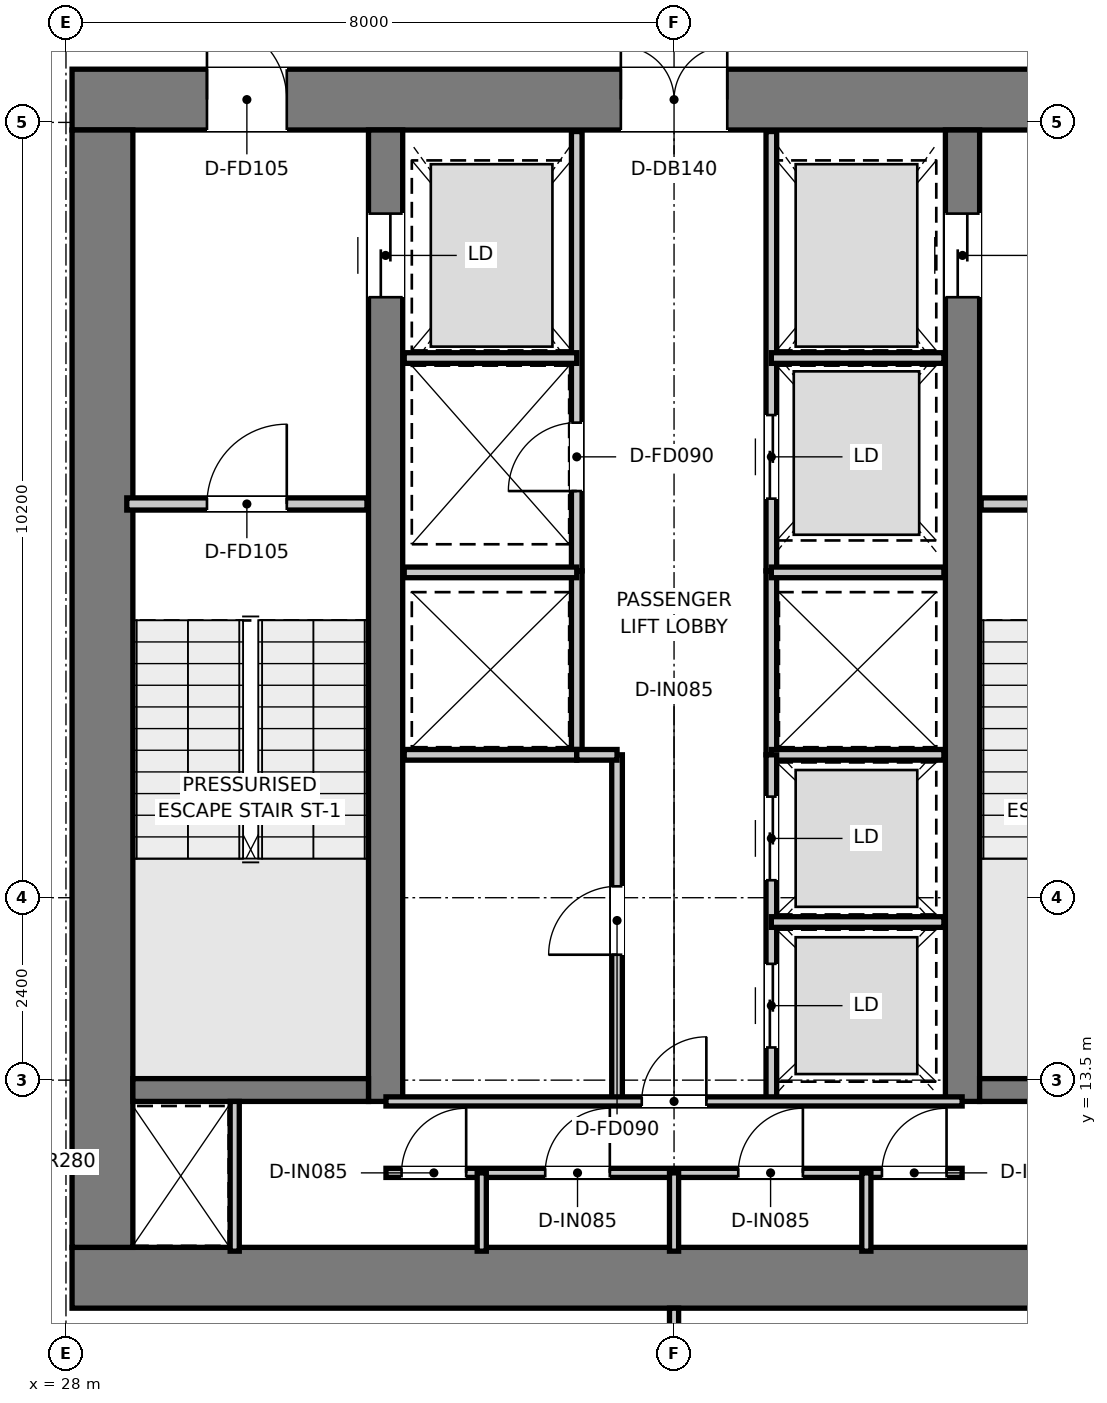
"""IFC4 building model, lengths in metres.
Left out: names, types, materials, properties, quantities, classifications, styles, units other than length and angle.
Written with IfcOpenShell. Run it as: python <this file> out.ifc"""

import sys

from ifc_helpers import new_model, si_unit, direction, frame, frame_2d, origin, place, context, subcontext, project, spatial, rectangle, extrude, element, fill, save


model = new_model("IFC4")
c1 = context("Model", 3, precision=1e-05, world=origin(), true_north=direction((0.0, 1.0)))
c2 = subcontext(c1, "Body", "Model", "MODEL_VIEW")
j1 = project(units=[si_unit("LENGTHUNIT", "METRE"), si_unit("PLANEANGLEUNIT", "RADIAN")], contexts=[c1])
p1 = place(None, origin())
s1 = spatial("IfcSite", under=j1, at=p1, CompositionType="ELEMENT")
p2 = place(p1, origin())
s2 = spatial("IfcBuilding", under=s1, at=p2, CompositionType="ELEMENT")
p3 = place(p2, frame((0.0, 0.0, 185.7)))
s3 = spatial("IfcBuildingStorey", under=s2, at=p3, CompositionType="ELEMENT", Elevation=185.7)
p4 = place(p3, frame((28.08, 10.9, 0.0), z_axis=(0.0, 0.0, 1.0), x_axis=(1.0, 0.0, 0.0)))
e1 = element("IfcWall", 1, at=p4, inside=s3, PredefinedType="SHEAR", context=c2, shape_type="SweptSolid", body=[
    extrude(rectangle(XDim=15.84, YDim=0.8, at=frame_2d((7.92, 0.0))), origin(), (0.0, 0.0, 1.0), 3.95),
])
p5 = place(p3, frame((28.08, 26.4, 0.0), z_axis=(0.0, 0.0, 1.0), x_axis=(1.0, 0.0, 0.0)))
e2 = element("IfcWall", 2, at=p5, inside=s3, PredefinedType="SHEAR", context=c2, shape_type="SweptSolid", body=[
    extrude(rectangle(XDim=15.84, YDim=0.8, at=frame_2d((7.92, 0.0))), origin(), (0.0, 0.0, 1.0), 3.95),
])
p6 = place(p5, frame((7.22, 0.0, 0.0)))
e3 = element("IfcOpeningElement", 3, at=p6, cuts=e2, PredefinedType="OPENING", context=c2, shape_type="SweptSolid", body=[
    extrude(rectangle(XDim=1.4, YDim=2.2, at=frame_2d((0.7, 1.1))), frame((0.0, 0.41, 0.0), z_axis=(0.0, -1.0, 0.0), x_axis=(1.0, 0.0, 0.0)), (0.0, 0.0, 1.0), 0.82),
])
p7 = place(p5, frame((1.775, 0.0, 0.0)))
e4 = element("IfcOpeningElement", 4, at=p7, cuts=e2, PredefinedType="OPENING", context=c2, shape_type="SweptSolid", body=[
    extrude(rectangle(XDim=1.05, YDim=2.1, at=frame_2d((0.525, 1.05))), frame((0.0, 0.41, 0.0), z_axis=(0.0, -1.0, 0.0), x_axis=(1.0, 0.0, 0.0)), (0.0, 0.0, 1.0), 0.82),
])
p8 = place(p5, frame((13.015, 0.0, 0.0)))
e5 = element("IfcOpeningElement", 5, at=p8, cuts=e2, PredefinedType="OPENING", context=c2, shape_type="SweptSolid", body=[
    extrude(rectangle(XDim=1.05, YDim=2.1, at=frame_2d((0.525, 1.05))), frame((0.0, 0.41, 0.0), z_axis=(0.0, -1.0, 0.0), x_axis=(1.0, 0.0, 0.0)), (0.0, 0.0, 1.0), 0.82),
])
p9 = place(p3, frame((28.48, 11.3, 0.0), z_axis=(0.0, 0.0, 1.0), x_axis=(0.0, 1.0, 0.0)))
e6 = element("IfcWall", 6, at=p9, inside=s3, PredefinedType="SHEAR", context=c2, shape_type="SweptSolid", body=[
    extrude(rectangle(XDim=14.7, YDim=0.8, at=frame_2d((7.35, 0.0))), origin(), (0.0, 0.0, 1.0), 3.95),
])
p10 = place(p3, frame((32.205, 13.22, 0.0), z_axis=(0.0, 0.0, 1.0), x_axis=(0.0, 1.0, 0.0)))
e7 = element("IfcWall", 7, at=p10, inside=s3, PredefinedType="SHEAR", context=c2, shape_type="SweptSolid", body=[
    extrude(rectangle(XDim=12.78, YDim=0.45, at=frame_2d((6.39, 0.0))), origin(), (0.0, 0.0, 1.0), 3.95),
])
p11 = place(p10, frame((10.58, 0.0, 0.0)))
e8 = element("IfcOpeningElement", 8, at=p11, cuts=e7, PredefinedType="OPENING", context=c2, shape_type="SweptSolid", body=[
    extrude(rectangle(XDim=1.1, YDim=2.15, at=frame_2d((0.55, 1.075))), frame((0.0, 0.235, 0.0), z_axis=(0.0, -1.0, 0.0), x_axis=(1.0, 0.0, 0.0)), (0.0, 0.0, 1.0), 0.47),
])
p12 = place(p3, frame((39.795, 13.22, 0.0), z_axis=(0.0, 0.0, 1.0), x_axis=(0.0, 1.0, 0.0)))
e9 = element("IfcWall", 9, at=p12, inside=s3, PredefinedType="SHEAR", context=c2, shape_type="SweptSolid", body=[
    extrude(rectangle(XDim=12.78, YDim=0.45, at=frame_2d((6.39, 0.0))), origin(), (0.0, 0.0, 1.0), 3.95),
])
p13 = place(p12, frame((10.58, 0.0, 0.0)))
e10 = element("IfcOpeningElement", 10, at=p13, cuts=e9, PredefinedType="OPENING", context=c2, shape_type="SweptSolid", body=[
    extrude(rectangle(XDim=1.1, YDim=2.15, at=frame_2d((0.55, 1.075))), frame((0.0, 0.235, 0.0), z_axis=(0.0, -1.0, 0.0), x_axis=(1.0, 0.0, 0.0)), (0.0, 0.0, 1.0), 0.47),
])
for number, where, z_axis, x_axis in (
    (11, (28.88, 13.37, 0.0), (0.0, 0.0, 1.0), (1.0, 0.0, 0.0)),
    (12, (40.02, 13.37, 0.0), (0.0, 0.0, 1.0), (1.0, 0.0, 0.0)),
):
    element("IfcWall", number, at=place(p3, frame(where, z_axis=z_axis, x_axis=x_axis)), inside=s3, PredefinedType="SHEAR", context=c2, shape_type="SweptSolid", body=[
        extrude(rectangle(XDim=3.1, YDim=0.3, at=frame_2d((1.55, 0.0))), origin(), (0.0, 0.0, 1.0), 3.95),
    ])
p14 = place(p3, frame((28.8, 21.08, 0.0), z_axis=(0.0, 0.0, 1.0), x_axis=(1.0, 0.0, 0.0)))
e13 = element("IfcWall", 13, at=p14, inside=s3, PredefinedType="PARTITIONING", context=c2, shape_type="SweptSolid", body=[
    extrude(rectangle(XDim=3.16, YDim=0.16, at=frame_2d((1.58, 0.0))), origin(), (0.0, 0.0, 1.0), 3.67),
])
p15 = place(p14, frame((1.055, 0.0, 0.0)))
e14 = element("IfcOpeningElement", 14, at=p15, cuts=e13, PredefinedType="OPENING", context=c2, shape_type="SweptSolid", body=[
    extrude(rectangle(XDim=1.05, YDim=2.1, at=frame_2d((0.525, 1.05))), frame((0.0, 0.09, 0.0), z_axis=(0.0, -1.0, 0.0), x_axis=(1.0, 0.0, 0.0)), (0.0, 0.0, 1.0), 0.18),
])
p16 = place(p3, frame((40.04, 21.08, 0.0), z_axis=(0.0, 0.0, 1.0), x_axis=(1.0, 0.0, 0.0)))
e15 = element("IfcWall", 15, at=p16, inside=s3, PredefinedType="PARTITIONING", context=c2, shape_type="SweptSolid", body=[
    extrude(rectangle(XDim=3.16, YDim=0.16, at=frame_2d((1.58, 0.0))), origin(), (0.0, 0.0, 1.0), 3.67),
])
p17 = place(p16, frame((1.055, 0.0, 0.0)))
e16 = element("IfcOpeningElement", 16, at=p17, cuts=e15, PredefinedType="OPENING", context=c2, shape_type="SweptSolid", body=[
    extrude(rectangle(XDim=1.05, YDim=2.1, at=frame_2d((0.525, 1.05))), frame((0.0, 0.09, 0.0), z_axis=(0.0, -1.0, 0.0), x_axis=(1.0, 0.0, 0.0)), (0.0, 0.0, 1.0), 0.18),
])
p18 = place(p3, frame((34.72, 20.2, 0.0), z_axis=(0.0, 0.0, 1.0), x_axis=(0.0, 1.0, 0.0)))
e17 = element("IfcWall", 17, at=p18, inside=s3, PredefinedType="PARTITIONING", context=c2, shape_type="SweptSolid", body=[
    extrude(rectangle(XDim=5.78, YDim=0.14, at=frame_2d((2.89, 0.0))), origin(), (0.0, 0.0, 1.0), 2.67),
])
p19 = place(p18, frame((1.05, 0.0, 0.0)))
e18 = element("IfcOpeningElement", 18, at=p19, cuts=e17, PredefinedType="OPENING", context=c2, shape_type="SweptSolid", body=[
    extrude(rectangle(XDim=0.9, YDim=2.1, at=frame_2d((0.45, 1.05))), frame((0.0, 0.08, 0.0), z_axis=(0.0, -1.0, 0.0), x_axis=(1.0, 0.0, 0.0)), (0.0, 0.0, 1.0), 0.16),
])
p20 = place(p3, frame((37.28, 20.2, 0.0), z_axis=(0.0, 0.0, 1.0), x_axis=(0.0, 1.0, 0.0)))
e19 = element("IfcWall", 19, at=p20, inside=s3, PredefinedType="PARTITIONING", context=c2, shape_type="SweptSolid", body=[
    extrude(rectangle(XDim=5.78, YDim=0.14, at=frame_2d((2.89, 0.0))), origin(), (0.0, 0.0, 1.0), 2.67),
])
p21 = place(p20, frame((0.95, 0.0, 0.0)))
e20 = element("IfcOpeningElement", 20, at=p21, cuts=e19, PredefinedType="OPENING", context=c2, shape_type="SweptSolid", body=[
    extrude(rectangle(XDim=1.1, YDim=2.15, at=frame_2d((0.55, 1.075))), frame((0.0, 0.08, 0.0), z_axis=(0.0, -1.0, 0.0), x_axis=(1.0, 0.0, 0.0)), (0.0, 0.0, 1.0), 0.16),
])
for number, where, z_axis, x_axis in (
    (21, (32.45, 23.0, 0.0), (0.0, 0.0, 1.0), (1.0, 0.0, 0.0)),
    (22, (37.28, 23.0, 0.0), (0.0, 0.0, 1.0), (1.0, 0.0, 0.0)),
):
    element("IfcWall", number, at=place(p3, frame(where, z_axis=z_axis, x_axis=x_axis)), inside=s3, PredefinedType="PARTITIONING", context=c2, shape_type="SweptSolid", body=[
        extrude(rectangle(XDim=2.27, YDim=0.14, at=frame_2d((1.135, 0.0))), origin(), (0.0, 0.0, 1.0), 2.67),
    ])
for number, where, z_axis, x_axis in (
    (23, (34.72, 17.78, 0.0), (0.0, 0.0, 1.0), (0.0, 1.0, 0.0)),
    (24, (37.28, 17.78, 0.0), (0.0, 0.0, 1.0), (0.0, 1.0, 0.0)),
):
    element("IfcWall", number, at=place(p3, frame(where, z_axis=z_axis, x_axis=x_axis)), inside=s3, PredefinedType="PARTITIONING", context=c2, shape_type="SweptSolid", body=[
        extrude(rectangle(XDim=2.42, YDim=0.14, at=frame_2d((1.21, 0.0))), origin(), (0.0, 0.0, 1.0), 3.67),
    ])
for number, where, z_axis, x_axis in (
    (25, (32.45, 17.78, 0.0), (0.0, 0.0, 1.0), (1.0, 0.0, 0.0)),
    (26, (32.45, 20.18, 0.0), (0.0, 0.0, 1.0), (1.0, 0.0, 0.0)),
    (27, (37.28, 17.78, 0.0), (0.0, 0.0, 1.0), (1.0, 0.0, 0.0)),
    (28, (37.28, 20.18, 0.0), (0.0, 0.0, 1.0), (1.0, 0.0, 0.0)),
):
    element("IfcWall", number, at=place(p3, frame(where, z_axis=z_axis, x_axis=x_axis)), inside=s3, PredefinedType="PARTITIONING", context=c2, shape_type="SweptSolid", body=[
        extrude(rectangle(XDim=2.27, YDim=0.14, at=frame_2d((1.135, 0.0))), origin(), (0.0, 0.0, 1.0), 3.67),
    ])
p22 = place(p3, frame((35.25, 13.22, 0.0), z_axis=(0.0, 0.0, 1.0), x_axis=(0.0, 1.0, 0.0)))
e29 = element("IfcWall", 29, at=p22, inside=s3, PredefinedType="PARTITIONING", context=c2, shape_type="SweptSolid", body=[
    extrude(rectangle(XDim=4.56, YDim=0.14, at=frame_2d((2.28, 0.0))), origin(), (0.0, 0.0, 1.0), 3.67),
])
p23 = place(p22, frame((1.93, 0.0, 0.0)))
e30 = element("IfcOpeningElement", 30, at=p23, cuts=e29, PredefinedType="OPENING", context=c2, shape_type="SweptSolid", body=[
    extrude(rectangle(XDim=0.9, YDim=2.1, at=frame_2d((0.45, 1.05))), frame((0.0, 0.08, 0.0), z_axis=(0.0, -1.0, 0.0), x_axis=(1.0, 0.0, 0.0)), (0.0, 0.0, 1.0), 0.16),
])
p24 = place(p3, frame((34.72, 17.78, 0.0), z_axis=(0.0, 0.0, 1.0), x_axis=(1.0, 0.0, 0.0)))
e31 = element("IfcWall", 31, at=p24, inside=s3, PredefinedType="PARTITIONING", context=c2, shape_type="SweptSolid", body=[
    extrude(rectangle(XDim=0.53, YDim=0.14, at=frame_2d((0.265, 0.0))), origin(), (0.0, 0.0, 1.0), 3.67),
])
p25 = place(p3, frame((37.28, 13.22, 0.0), z_axis=(0.0, 0.0, 1.0), x_axis=(0.0, 1.0, 0.0)))
e32 = element("IfcWall", 32, at=p25, inside=s3, PredefinedType="PARTITIONING", context=c2, shape_type="SweptSolid", body=[
    extrude(rectangle(XDim=4.56, YDim=0.14, at=frame_2d((2.28, 0.0))), origin(), (0.0, 0.0, 1.0), 3.67),
])
p26 = place(p25, frame((0.71, 0.0, 0.0)))
e33 = element("IfcOpeningElement", 33, at=p26, cuts=e32, PredefinedType="OPENING", context=c2, shape_type="SweptSolid", body=[
    extrude(rectangle(XDim=1.1, YDim=2.15, at=frame_2d((0.55, 1.075))), frame((0.0, 0.08, 0.0), z_axis=(0.0, -1.0, 0.0), x_axis=(1.0, 0.0, 0.0)), (0.0, 0.0, 1.0), 0.16),
])
p27 = place(p25, frame((2.91, 0.0, 0.0)))
e34 = element("IfcOpeningElement", 34, at=p27, cuts=e32, PredefinedType="OPENING", context=c2, shape_type="SweptSolid", body=[
    extrude(rectangle(XDim=1.1, YDim=2.15, at=frame_2d((0.55, 1.075))), frame((0.0, 0.08, 0.0), z_axis=(0.0, -1.0, 0.0), x_axis=(1.0, 0.0, 0.0)), (0.0, 0.0, 1.0), 0.16),
])
p28 = place(p3, frame((37.28, 15.58, 0.0), z_axis=(0.0, 0.0, 1.0), x_axis=(1.0, 0.0, 0.0)))
e35 = element("IfcWall", 35, at=p28, inside=s3, PredefinedType="PARTITIONING", context=c2, shape_type="SweptSolid", body=[
    extrude(rectangle(XDim=2.27, YDim=0.14, at=frame_2d((1.135, 0.0))), origin(), (0.0, 0.0, 1.0), 3.67),
])
p29 = place(p3, frame((30.22, 11.25, 0.0), z_axis=(0.0, 0.0, 1.0), x_axis=(0.0, 1.0, 0.0)))
e36 = element("IfcWall", 36, at=p29, inside=s3, PredefinedType="PARTITIONING", context=c2, shape_type="SweptSolid", body=[
    extrude(rectangle(XDim=1.97, YDim=0.12, at=frame_2d((0.985, 0.0))), origin(), (0.0, 0.0, 1.0), 3.67),
])
p30 = place(p3, frame((32.21, 13.22, 0.0), z_axis=(0.0, 0.0, 1.0), x_axis=(1.0, 0.0, 0.0)))
e37 = element("IfcWall", 37, at=p30, inside=s3, PredefinedType="PARTITIONING", context=c2, shape_type="SweptSolid", body=[
    extrude(rectangle(XDim=7.58, YDim=0.12, at=frame_2d((3.79, 0.0))), origin(), (0.0, 0.0, 1.0), 3.67),
])
p31 = place(p30, frame((3.365, 0.0, 0.0)))
e38 = element("IfcOpeningElement", 38, at=p31, cuts=e37, PredefinedType="OPENING", context=c2, shape_type="SweptSolid", body=[
    extrude(rectangle(XDim=0.85, YDim=2.1, at=frame_2d((0.425, 1.05))), frame((0.0, 0.07, 0.0), z_axis=(0.0, -1.0, 0.0), x_axis=(1.0, 0.0, 0.0)), (0.0, 0.0, 1.0), 0.14),
])
p32 = place(p3, frame((32.21, 12.28, 0.0), z_axis=(0.0, 0.0, 1.0), x_axis=(1.0, 0.0, 0.0)))
e39 = element("IfcWall", 39, at=p32, inside=s3, PredefinedType="PARTITIONING", context=c2, shape_type="SweptSolid", body=[
    extrude(rectangle(XDim=7.58, YDim=0.12, at=frame_2d((3.79, 0.0))), origin(), (0.0, 0.0, 1.0), 3.67),
])
p33 = place(p32, frame((0.205, 0.0, 0.0)))
e40 = element("IfcOpeningElement", 40, at=p33, cuts=e39, PredefinedType="OPENING", context=c2, shape_type="SweptSolid", body=[
    extrude(rectangle(XDim=0.85, YDim=2.1, at=frame_2d((0.425, 1.05))), frame((0.0, 0.07, 0.0), z_axis=(0.0, -1.0, 0.0), x_axis=(1.0, 0.0, 0.0)), (0.0, 0.0, 1.0), 0.14),
])
p34 = place(p32, frame((2.095, 0.0, 0.0)))
e41 = element("IfcOpeningElement", 41, at=p34, cuts=e39, PredefinedType="OPENING", context=c2, shape_type="SweptSolid", body=[
    extrude(rectangle(XDim=0.85, YDim=2.1, at=frame_2d((0.425, 1.05))), frame((0.0, 0.07, 0.0), z_axis=(0.0, -1.0, 0.0), x_axis=(1.0, 0.0, 0.0)), (0.0, 0.0, 1.0), 0.14),
])
p35 = place(p32, frame((4.635, 0.0, 0.0)))
e42 = element("IfcOpeningElement", 42, at=p35, cuts=e39, PredefinedType="OPENING", context=c2, shape_type="SweptSolid", body=[
    extrude(rectangle(XDim=0.85, YDim=2.1, at=frame_2d((0.425, 1.05))), frame((0.0, 0.07, 0.0), z_axis=(0.0, -1.0, 0.0), x_axis=(1.0, 0.0, 0.0)), (0.0, 0.0, 1.0), 0.14),
])
p36 = place(p32, frame((6.525, 0.0, 0.0)))
e43 = element("IfcOpeningElement", 43, at=p36, cuts=e39, PredefinedType="OPENING", context=c2, shape_type="SweptSolid", body=[
    extrude(rectangle(XDim=0.85, YDim=2.1, at=frame_2d((0.425, 1.05))), frame((0.0, 0.07, 0.0), z_axis=(0.0, -1.0, 0.0), x_axis=(1.0, 0.0, 0.0)), (0.0, 0.0, 1.0), 0.14),
])
for number, where, z_axis, x_axis in (
    (44, (33.47, 11.25, 0.0), (0.0, 0.0, 1.0), (0.0, 1.0, 0.0)),
    (45, (36.0, 11.25, 0.0), (0.0, 0.0, 1.0), (0.0, 1.0, 0.0)),
    (46, (38.53, 11.25, 0.0), (0.0, 0.0, 1.0), (0.0, 1.0, 0.0)),
):
    element("IfcWall", number, at=place(p3, frame(where, z_axis=z_axis, x_axis=x_axis)), inside=s3, PredefinedType="PARTITIONING", context=c2, shape_type="SweptSolid", body=[
        extrude(rectangle(XDim=1.03, YDim=0.12, at=frame_2d((0.515, 0.0))), origin(), (0.0, 0.0, 1.0), 3.67),
    ])
p37 = place(p3, frame((36.0, 0.392, 0.0), z_axis=(0.0, 0.0, 1.0), x_axis=(0.0, 1.0, 0.0)))
e47 = element("IfcWall", 47, at=p37, inside=s3, PredefinedType="PARTITIONING", context=c2, shape_type="SweptSolid", body=[
    extrude(rectangle(XDim=10.108, YDim=0.12, at=frame_2d((5.054, 0.0))), origin(), (0.0, 0.0, 1.0), 3.67),
])
p38 = place(p15, origin())
e48 = element("IfcDoor", 48, at=p38, inside=s3, OperationType="SINGLE_SWING_RIGHT", PredefinedType="DOOR", context=c2, shape_type="SweptSolid", body=[
    extrude(rectangle(XDim=1.05, YDim=2.1, at=frame_2d((0.525, 1.05))), frame((0.0, 0.025, 0.0), z_axis=(0.0, -1.0, 0.0), x_axis=(1.0, 0.0, 0.0)), (0.0, 0.0, 1.0), 0.05),
])
fill(e14, e48)
p39 = place(p6, origin())
e49 = element("IfcDoor", 49, at=p39, inside=s3, OperationType="DOUBLE_DOOR_SINGLE_SWING", PredefinedType="DOOR", context=c2, shape_type="SweptSolid", body=[
    extrude(rectangle(XDim=1.4, YDim=2.2, at=frame_2d((0.7, 1.1))), frame((0.0, 0.025, 0.0), z_axis=(0.0, -1.0, 0.0), x_axis=(1.0, 0.0, 0.0)), (0.0, 0.0, 1.0), 0.05),
])
fill(e3, e49)
p40 = place(p7, origin())
e50 = element("IfcDoor", 50, at=p40, inside=s3, OperationType="SINGLE_SWING_LEFT", PredefinedType="DOOR", context=c2, shape_type="SweptSolid", body=[
    extrude(rectangle(XDim=1.05, YDim=2.1, at=frame_2d((0.525, 1.05))), frame((0.0, 0.025, 0.0), z_axis=(0.0, -1.0, 0.0), x_axis=(1.0, 0.0, 0.0)), (0.0, 0.0, 1.0), 0.05),
])
fill(e4, e50)
p41 = place(p11, origin())
e51 = element("IfcDoor", 51, at=p41, inside=s3, OperationType="DOUBLE_DOOR_SLIDING", PredefinedType="DOOR", context=c2, shape_type="SweptSolid", body=[
    extrude(rectangle(XDim=1.1, YDim=2.15, at=frame_2d((0.55, 1.075))), frame((0.0, 0.025, 0.0), z_axis=(0.0, -1.0, 0.0), x_axis=(1.0, 0.0, 0.0)), (0.0, 0.0, 1.0), 0.05),
])
fill(e8, e51)
p42 = place(p13, origin())
e52 = element("IfcDoor", 52, at=p42, inside=s3, OperationType="DOUBLE_DOOR_SLIDING", PredefinedType="DOOR", context=c2, shape_type="SweptSolid", body=[
    extrude(rectangle(XDim=1.1, YDim=2.15, at=frame_2d((0.55, 1.075))), frame((0.0, 0.025, 0.0), z_axis=(0.0, -1.0, 0.0), x_axis=(1.0, 0.0, 0.0)), (0.0, 0.0, 1.0), 0.05),
])
fill(e10, e52)
p43 = place(p19, origin())
e53 = element("IfcDoor", 53, at=p43, inside=s3, OperationType="SINGLE_SWING_LEFT", PredefinedType="DOOR", context=c2, shape_type="SweptSolid", body=[
    extrude(rectangle(XDim=0.9, YDim=2.1, at=frame_2d((0.45, 1.05))), frame((0.0, 0.025, 0.0), z_axis=(0.0, -1.0, 0.0), x_axis=(1.0, 0.0, 0.0)), (0.0, 0.0, 1.0), 0.05),
])
fill(e18, e53)
p44 = place(p21, origin())
e54 = element("IfcDoor", 54, at=p44, inside=s3, OperationType="DOUBLE_DOOR_SLIDING", PredefinedType="DOOR", context=c2, shape_type="SweptSolid", body=[
    extrude(rectangle(XDim=1.1, YDim=2.15, at=frame_2d((0.55, 1.075))), frame((0.0, 0.025, 0.0), z_axis=(0.0, -1.0, 0.0), x_axis=(1.0, 0.0, 0.0)), (0.0, 0.0, 1.0), 0.05),
])
fill(e20, e54)
p45 = place(p23, origin())
e55 = element("IfcDoor", 55, at=p45, inside=s3, OperationType="SINGLE_SWING_LEFT", PredefinedType="DOOR", context=c2, shape_type="SweptSolid", body=[
    extrude(rectangle(XDim=0.9, YDim=2.1, at=frame_2d((0.45, 1.05))), frame((0.0, 0.025, 0.0), z_axis=(0.0, -1.0, 0.0), x_axis=(1.0, 0.0, 0.0)), (0.0, 0.0, 1.0), 0.05),
])
fill(e30, e55)
p46 = place(p26, origin())
e56 = element("IfcDoor", 56, at=p46, inside=s3, OperationType="DOUBLE_DOOR_SLIDING", PredefinedType="DOOR", context=c2, shape_type="SweptSolid", body=[
    extrude(rectangle(XDim=1.1, YDim=2.15, at=frame_2d((0.55, 1.075))), frame((0.0, 0.025, 0.0), z_axis=(0.0, -1.0, 0.0), x_axis=(1.0, 0.0, 0.0)), (0.0, 0.0, 1.0), 0.05),
])
fill(e33, e56)
p47 = place(p27, origin())
e57 = element("IfcDoor", 57, at=p47, inside=s3, OperationType="DOUBLE_DOOR_SLIDING", PredefinedType="DOOR", context=c2, shape_type="SweptSolid", body=[
    extrude(rectangle(XDim=1.1, YDim=2.15, at=frame_2d((0.55, 1.075))), frame((0.0, 0.025, 0.0), z_axis=(0.0, -1.0, 0.0), x_axis=(1.0, 0.0, 0.0)), (0.0, 0.0, 1.0), 0.05),
])
fill(e34, e57)
p48 = place(p31, origin())
e58 = element("IfcDoor", 58, at=p48, inside=s3, OperationType="SINGLE_SWING_RIGHT", PredefinedType="DOOR", context=c2, shape_type="SweptSolid", body=[
    extrude(rectangle(XDim=0.85, YDim=2.1, at=frame_2d((0.425, 1.05))), frame((0.0, 0.025, 0.0), z_axis=(0.0, -1.0, 0.0), x_axis=(1.0, 0.0, 0.0)), (0.0, 0.0, 1.0), 0.05),
])
fill(e38, e58)
p49 = place(p33, origin())
e59 = element("IfcDoor", 59, at=p49, inside=s3, OperationType="SINGLE_SWING_RIGHT", PredefinedType="DOOR", context=c2, shape_type="SweptSolid", body=[
    extrude(rectangle(XDim=0.85, YDim=2.1, at=frame_2d((0.425, 1.05))), frame((0.0, 0.025, 0.0), z_axis=(0.0, -1.0, 0.0), x_axis=(1.0, 0.0, 0.0)), (0.0, 0.0, 1.0), 0.05),
])
fill(e40, e59)
p50 = place(p34, origin())
e60 = element("IfcDoor", 60, at=p50, inside=s3, OperationType="SINGLE_SWING_RIGHT", PredefinedType="DOOR", context=c2, shape_type="SweptSolid", body=[
    extrude(rectangle(XDim=0.85, YDim=2.1, at=frame_2d((0.425, 1.05))), frame((0.0, 0.025, 0.0), z_axis=(0.0, -1.0, 0.0), x_axis=(1.0, 0.0, 0.0)), (0.0, 0.0, 1.0), 0.05),
])
fill(e41, e60)
p51 = place(p35, origin())
e61 = element("IfcDoor", 61, at=p51, inside=s3, OperationType="SINGLE_SWING_RIGHT", PredefinedType="DOOR", context=c2, shape_type="SweptSolid", body=[
    extrude(rectangle(XDim=0.85, YDim=2.1, at=frame_2d((0.425, 1.05))), frame((0.0, 0.025, 0.0), z_axis=(0.0, -1.0, 0.0), x_axis=(1.0, 0.0, 0.0)), (0.0, 0.0, 1.0), 0.05),
])
fill(e42, e61)
p52 = place(p36, origin())
e62 = element("IfcDoor", 62, at=p52, inside=s3, OperationType="SINGLE_SWING_RIGHT", PredefinedType="DOOR", context=c2, shape_type="SweptSolid", body=[
    extrude(rectangle(XDim=0.85, YDim=2.1, at=frame_2d((0.425, 1.05))), frame((0.0, 0.025, 0.0), z_axis=(0.0, -1.0, 0.0), x_axis=(1.0, 0.0, 0.0)), (0.0, 0.0, 1.0), 0.05),
])
fill(e43, e62)
save(model, sys.argv[1])
